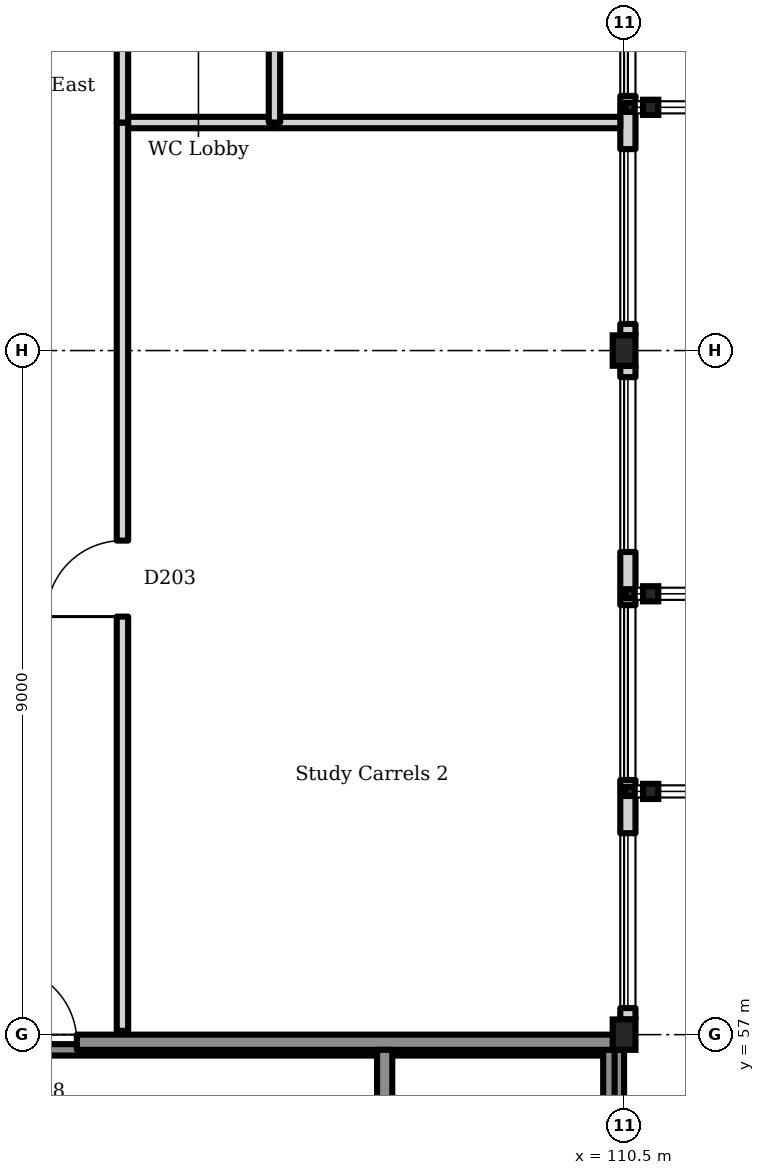
"""IFC4 building model, lengths in metres.
Left out: names, types, materials, properties, quantities, classifications, styles, units other than length and angle.
Written with IfcOpenShell. Run it as: python <this file> out.ifc"""

import sys

from ifc_helpers import new_model, si_unit, direction, frame, frame_2d, origin, origin_2d, place, context, subcontext, project, spatial, rectangle, hollow_rectangle, i_section, extrude, element, fill, save


model = new_model("IFC4")
c1 = context("Model", 3, precision=1e-05, world=origin(), true_north=direction((0.0, 1.0)))
c2 = subcontext(c1, "Body", "Model", "MODEL_VIEW")
j1 = project(units=[si_unit("LENGTHUNIT", "METRE"), si_unit("PLANEANGLEUNIT", "RADIAN")], contexts=[c1])
p1 = place(None, origin())
s1 = spatial("IfcSite", under=j1, at=p1, CompositionType="ELEMENT")
p2 = place(p1, origin())
s2 = spatial("IfcBuilding", under=s1, at=p2, CompositionType="ELEMENT")
p3 = place(p2, frame((0.0, 0.0, 9.9)))
s3 = spatial("IfcBuildingStorey", under=s2, at=p3, CompositionType="ELEMENT", Elevation=9.9)
for number, where, z_axis, x_axis in (
    (1, (110.5, 57.0, 0.0), (0.0, 0.0, 1.0), (1.0, 0.0, 0.0)),
    (2, (110.5, 66.0, 0.0), (0.0, 0.0, 1.0), (1.0, 0.0, 0.0)),
):
    element("IfcColumn", number, at=place(p3, frame(where, z_axis=z_axis, x_axis=x_axis)), inside=s3, PredefinedType="COLUMN", context=c2, shape_type="SweptSolid", body=[
        extrude(i_section(OverallWidth=0.3, OverallDepth=0.4, WebThickness=0.013, FlangeThickness=0.024, FilletRadius=0.027, at=origin_2d()), origin(), (0.0, 0.0, 1.0), 4.25),
    ])
p4 = place(p3, frame((110.55, 57.2, 0.0), z_axis=(0.0, 0.0, 1.0), x_axis=(0.0, 1.0, 0.0)))
e3 = element("IfcWall", 3, at=p4, inside=s3, PredefinedType="SOLIDWALL", context=c2, shape_type="SweptSolid", body=[
    extrude(rectangle(XDim=8.6, YDim=0.2, at=frame_2d((4.3, 0.0))), origin(), (0.0, 0.0, 1.0), 3.8),
])
p5 = place(p4, frame((0.15, 0.0, 0.9)))
e4 = element("IfcOpeningElement", 4, at=p5, cuts=e3, PredefinedType="OPENING", context=c2, shape_type="SweptSolid", body=[
    extrude(rectangle(XDim=2.3, YDim=2.7, at=frame_2d((1.15, 1.35))), frame((0.0, 0.11, 0.0), z_axis=(0.0, -1.0, 0.0), x_axis=(1.0, 0.0, 0.0)), (0.0, 0.0, 1.0), 0.22),
])
p6 = place(p4, frame((3.15, 0.0, 0.9)))
e5 = element("IfcOpeningElement", 5, at=p6, cuts=e3, PredefinedType="OPENING", context=c2, shape_type="SweptSolid", body=[
    extrude(rectangle(XDim=2.3, YDim=2.7, at=frame_2d((1.15, 1.35))), frame((0.0, 0.11, 0.0), z_axis=(0.0, -1.0, 0.0), x_axis=(1.0, 0.0, 0.0)), (0.0, 0.0, 1.0), 0.22),
])
p7 = place(p4, frame((6.15, 0.0, 0.9)))
e6 = element("IfcOpeningElement", 6, at=p7, cuts=e3, PredefinedType="OPENING", context=c2, shape_type="SweptSolid", body=[
    extrude(rectangle(XDim=2.3, YDim=2.7, at=frame_2d((1.15, 1.35))), frame((0.0, 0.11, 0.0), z_axis=(0.0, -1.0, 0.0), x_axis=(1.0, 0.0, 0.0)), (0.0, 0.0, 1.0), 0.22),
])
p8 = place(p3, frame((110.55, 66.2, 0.0), z_axis=(0.0, 0.0, 1.0), x_axis=(0.0, 1.0, 0.0)))
e7 = element("IfcWall", 7, at=p8, inside=s3, PredefinedType="SOLIDWALL", context=c2, shape_type="SweptSolid", body=[
    extrude(rectangle(XDim=8.584, YDim=0.2, at=frame_2d((4.292, 0.0))), origin(), (0.0, 0.0, 1.0), 3.8),
])
p9 = place(p8, frame((0.15, 0.0, 0.9)))
e8 = element("IfcOpeningElement", 8, at=p9, cuts=e7, PredefinedType="OPENING", context=c2, shape_type="SweptSolid", body=[
    extrude(rectangle(XDim=2.3, YDim=2.7, at=frame_2d((1.15, 1.35))), frame((0.0, 0.11, 0.0), z_axis=(0.0, -1.0, 0.0), x_axis=(1.0, 0.0, 0.0)), (0.0, 0.0, 1.0), 0.22),
])
p10 = place(p8, frame((3.15, 0.0, 0.9)))
e9 = element("IfcOpeningElement", 9, at=p10, cuts=e7, PredefinedType="OPENING", context=c2, shape_type="SweptSolid", body=[
    extrude(rectangle(XDim=2.3, YDim=2.7, at=frame_2d((1.15, 1.35))), frame((0.0, 0.11, 0.0), z_axis=(0.0, -1.0, 0.0), x_axis=(1.0, 0.0, 0.0)), (0.0, 0.0, 1.0), 0.22),
])
p11 = place(p8, frame((6.15, 0.0, 0.9)))
e10 = element("IfcOpeningElement", 10, at=p11, cuts=e7, PredefinedType="OPENING", context=c2, shape_type="SweptSolid", body=[
    extrude(rectangle(XDim=2.3, YDim=2.7, at=frame_2d((1.15, 1.35))), frame((0.0, 0.11, 0.0), z_axis=(0.0, -1.0, 0.0), x_axis=(1.0, 0.0, 0.0)), (0.0, 0.0, 1.0), 0.22),
])
p12 = place(p3, frame((110.4, 48.2, 0.0), z_axis=(0.0, 0.0, 1.0), x_axis=(0.0, 1.0, 0.0)))
e11 = element("IfcWall", 11, at=p12, inside=s3, PredefinedType="SHEAR", context=c2, shape_type="SweptSolid", body=[
    extrude(rectangle(XDim=8.6, YDim=0.2, at=frame_2d((4.3, 0.0))), origin(), (0.0, 0.0, 1.0), 4.0),
])
for number, where, z_axis, x_axis in (
    (12, (101.7, 56.8, 4.25), (0.0, 0.0, 1.0), (1.0, 0.0, 0.0)),
    (13, (110.3, 48.2, 4.25), (0.0, 0.0, 1.0), (0.0, 1.0, 0.0)),
):
    element("IfcWall", number, at=place(p3, frame(where, z_axis=z_axis, x_axis=x_axis)), inside=s3, PredefinedType="SOLIDWALL", context=c2, shape_type="SweptSolid", body=[
        extrude(rectangle(XDim=8.6, YDim=0.15, at=frame_2d((4.3, 0.0))), origin(), (0.0, 0.0, 1.0), 0.15),
    ])
p13 = place(p3, frame((101.5, 56.9, 0.0), z_axis=(0.0, 0.0, 1.0), x_axis=(1.0, 0.0, 0.0)))
e14 = element("IfcWall", 14, at=p13, inside=s3, PredefinedType="SHEAR", context=c2, shape_type="SweptSolid", body=[
    extrude(rectangle(XDim=9.0, YDim=0.2, at=frame_2d((4.5, 0.0))), origin(), (0.0, 0.0, 1.0), 4.0),
])
p14 = place(p13, frame((0.8, 0.0, 0.0)))
e15 = element("IfcOpeningElement", 15, at=p14, cuts=e14, PredefinedType="OPENING", context=c2, shape_type="SweptSolid", body=[
    extrude(rectangle(XDim=1.0, YDim=2.1, at=frame_2d((0.5, 1.05))), frame((0.0, 0.11, 0.0), z_axis=(0.0, -1.0, 0.0), x_axis=(1.0, 0.0, 0.0)), (0.0, 0.0, 1.0), 0.22),
])
p15 = place(p3, frame((107.35, 48.15, 0.0), z_axis=(0.0, 0.0, 1.0), x_axis=(0.0, 1.0, 0.0)))
e16 = element("IfcWall", 16, at=p15, inside=s3, PredefinedType="SHEAR", context=c2, shape_type="SweptSolid", body=[
    extrude(rectangle(XDim=8.65, YDim=0.2, at=frame_2d((4.325, 0.0))), origin(), (0.0, 0.0, 1.0), 4.0),
])
p16 = place(p15, frame((0.35, 0.0, 0.0)))
e17 = element("IfcOpeningElement", 17, at=p16, cuts=e16, PredefinedType="OPENING", context=c2, shape_type="SweptSolid", body=[
    extrude(rectangle(XDim=1.0, YDim=2.1, at=frame_2d((0.5, 1.05))), frame((0.0, 0.11, 0.0), z_axis=(0.0, -1.0, 0.0), x_axis=(1.0, 0.0, 0.0)), (0.0, 0.0, 1.0), 0.22),
])
p17 = place(p3, frame((105.9, 69.0, 0.0), z_axis=(0.0, 0.0, 1.0), x_axis=(1.0, 0.0, 0.0)))
e18 = element("IfcWall", 18, at=p17, inside=s3, PredefinedType="PARTITIONING", context=c2, shape_type="SweptSolid", body=[
    extrude(rectangle(XDim=4.55, YDim=0.15, at=frame_2d((2.275, 0.0))), origin(), (0.0, 0.0, 1.0), 3.65),
])
p18 = place(p3, frame((103.9, 69.0, 0.0), z_axis=(0.0, 0.0, 1.0), x_axis=(1.0, 0.0, 0.0)))
e19 = element("IfcWall", 19, at=p18, inside=s3, PredefinedType="PARTITIONING", context=c2, shape_type="SweptSolid", body=[
    extrude(rectangle(XDim=2.0, YDim=0.15, at=frame_2d((1.0, 0.0))), origin(), (0.0, 0.0, 1.0), 3.65),
])
p19 = place(p3, frame((103.9, 57.05, 0.0), z_axis=(0.0, 0.0, 1.0), x_axis=(0.0, 1.0, 0.0)))
e20 = element("IfcWall", 20, at=p19, inside=s3, PredefinedType="PARTITIONING", context=c2, shape_type="SweptSolid", body=[
    extrude(rectangle(XDim=11.95, YDim=0.15, at=frame_2d((5.975, 0.0))), origin(), (0.0, 0.0, 1.0), 3.65),
])
p20 = place(p19, frame((5.45, 0.0, 0.0)))
e21 = element("IfcOpeningElement", 21, at=p20, cuts=e20, PredefinedType="OPENING", context=c2, shape_type="SweptSolid", body=[
    extrude(rectangle(XDim=1.0, YDim=2.1, at=frame_2d((0.5, 1.05))), frame((0.0, 0.085, 0.0), z_axis=(0.0, -1.0, 0.0), x_axis=(1.0, 0.0, 0.0)), (0.0, 0.0, 1.0), 0.17),
])
p21 = place(p3, frame((105.9, 69.0, 0.0), z_axis=(0.0, 0.0, 1.0), x_axis=(0.0, 1.0, 0.0)))
e22 = element("IfcWall", 22, at=p21, inside=s3, PredefinedType="PARTITIONING", context=c2, shape_type="SweptSolid", body=[
    extrude(rectangle(XDim=3.0, YDim=0.15, at=frame_2d((1.5, 0.0))), origin(), (0.0, 0.0, 1.0), 3.65),
])
p22 = place(p21, frame((1.0, 0.0, 0.0)))
e23 = element("IfcOpeningElement", 23, at=p22, cuts=e22, PredefinedType="OPENING", context=c2, shape_type="SweptSolid", body=[
    extrude(rectangle(XDim=1.0, YDim=2.1, at=frame_2d((0.5, 1.05))), frame((0.0, 0.085, 0.0), z_axis=(0.0, -1.0, 0.0), x_axis=(1.0, 0.0, 0.0)), (0.0, 0.0, 1.0), 0.17),
])
p23 = place(p3, frame((103.9, 69.0, 0.0), z_axis=(0.0, 0.0, 1.0), x_axis=(0.0, 1.0, 0.0)))
e24 = element("IfcWall", 24, at=p23, inside=s3, PredefinedType="PARTITIONING", context=c2, shape_type="SweptSolid", body=[
    extrude(rectangle(XDim=5.95, YDim=0.15, at=frame_2d((2.975, 0.0))), origin(), (0.0, 0.0, 1.0), 3.65),
])
p24 = place(p23, frame((2.5, 0.0, 0.0)))
e25 = element("IfcOpeningElement", 25, at=p24, cuts=e24, PredefinedType="OPENING", context=c2, shape_type="SweptSolid", body=[
    extrude(rectangle(XDim=1.0, YDim=2.1, at=frame_2d((0.5, 1.05))), frame((0.0, 0.085, 0.0), z_axis=(0.0, -1.0, 0.0), x_axis=(1.0, 0.0, 0.0)), (0.0, 0.0, 1.0), 0.17),
])
for number, where, z_axis, x_axis in (
    (26, (110.85, 60.2, 0.0), (0.0, 0.0, 1.0), (1.0, 0.0, 0.0)),
    (27, (110.85, 62.8, 0.0), (0.0, 0.0, 1.0), (1.0, 0.0, 0.0)),
    (28, (110.85, 69.2, 0.0), (0.0, 0.0, 1.0), (1.0, 0.0, 0.0)),
):
    element("IfcColumn", number, at=place(p3, frame(where, z_axis=z_axis, x_axis=x_axis)), inside=s3, PredefinedType="COLUMN", context=c2, shape_type="SweptSolid", body=[
        extrude(hollow_rectangle(XDim=0.2, YDim=0.2, WallThickness=0.01, InnerFilletRadius=0.01, OuterFilletRadius=0.015, at=origin_2d()), origin(), (0.0, 0.0, 1.0), 4.5),
    ])
p25 = place(p5, origin())
e29 = element("IfcWindow", 29, at=p25, inside=s3, PartitioningType="SINGLE_PANEL", PredefinedType="WINDOW", context=c2, shape_type="SweptSolid", body=[
    extrude(rectangle(XDim=2.3, YDim=2.7, at=frame_2d((1.15, 1.35))), frame((0.0, 0.03, 0.0), z_axis=(0.0, -1.0, 0.0), x_axis=(1.0, 0.0, 0.0)), (0.0, 0.0, 1.0), 0.06),
])
fill(e4, e29)
p26 = place(p6, origin())
e30 = element("IfcWindow", 30, at=p26, inside=s3, PartitioningType="SINGLE_PANEL", PredefinedType="WINDOW", context=c2, shape_type="SweptSolid", body=[
    extrude(rectangle(XDim=2.3, YDim=2.7, at=frame_2d((1.15, 1.35))), frame((0.0, 0.03, 0.0), z_axis=(0.0, -1.0, 0.0), x_axis=(1.0, 0.0, 0.0)), (0.0, 0.0, 1.0), 0.06),
])
fill(e5, e30)
p27 = place(p7, origin())
e31 = element("IfcWindow", 31, at=p27, inside=s3, PartitioningType="SINGLE_PANEL", PredefinedType="WINDOW", context=c2, shape_type="SweptSolid", body=[
    extrude(rectangle(XDim=2.3, YDim=2.7, at=frame_2d((1.15, 1.35))), frame((0.0, 0.03, 0.0), z_axis=(0.0, -1.0, 0.0), x_axis=(1.0, 0.0, 0.0)), (0.0, 0.0, 1.0), 0.06),
])
fill(e6, e31)
p28 = place(p9, origin())
e32 = element("IfcWindow", 32, at=p28, inside=s3, PartitioningType="SINGLE_PANEL", PredefinedType="WINDOW", context=c2, shape_type="SweptSolid", body=[
    extrude(rectangle(XDim=2.3, YDim=2.7, at=frame_2d((1.15, 1.35))), frame((0.0, 0.03, 0.0), z_axis=(0.0, -1.0, 0.0), x_axis=(1.0, 0.0, 0.0)), (0.0, 0.0, 1.0), 0.06),
])
fill(e8, e32)
p29 = place(p10, origin())
e33 = element("IfcWindow", 33, at=p29, inside=s3, PartitioningType="SINGLE_PANEL", PredefinedType="WINDOW", context=c2, shape_type="SweptSolid", body=[
    extrude(rectangle(XDim=2.3, YDim=2.7, at=frame_2d((1.15, 1.35))), frame((0.0, 0.03, 0.0), z_axis=(0.0, -1.0, 0.0), x_axis=(1.0, 0.0, 0.0)), (0.0, 0.0, 1.0), 0.06),
])
fill(e9, e33)
p30 = place(p14, origin())
e34 = element("IfcDoor", 34, at=p30, inside=s3, OperationType="SINGLE_SWING_RIGHT", PredefinedType="DOOR", context=c2, shape_type="SweptSolid", body=[
    extrude(rectangle(XDim=1.0, YDim=2.1, at=frame_2d((0.5, 1.05))), frame((0.0, 0.025, 0.0), z_axis=(0.0, -1.0, 0.0), x_axis=(1.0, 0.0, 0.0)), (0.0, 0.0, 1.0), 0.05),
])
fill(e15, e34)
p31 = place(p20, origin())
e35 = element("IfcDoor", 35, at=p31, inside=s3, OperationType="SINGLE_SWING_RIGHT", PredefinedType="DOOR", context=c2, shape_type="SweptSolid", body=[
    extrude(rectangle(XDim=1.0, YDim=2.1, at=frame_2d((0.5, 1.05))), frame((0.0, 0.025, 0.0), z_axis=(0.0, -1.0, 0.0), x_axis=(1.0, 0.0, 0.0)), (0.0, 0.0, 1.0), 0.05),
])
fill(e21, e35)
save(model, sys.argv[1])
